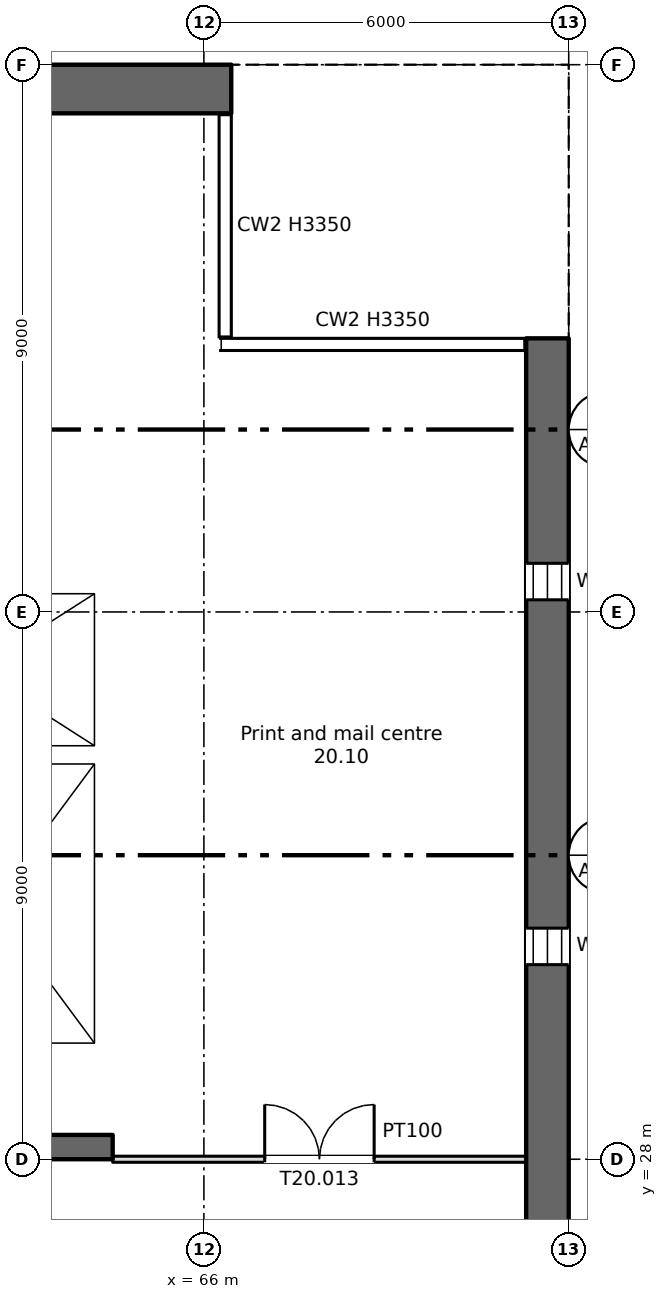
"""IFC4 building model, lengths in metres.
Left out: names, types, materials, properties, quantities, classifications, styles, units other than length and angle.
Written with IfcOpenShell. Run it as: python <this file> out.ifc"""

import sys

from ifc_helpers import new_model, si_unit, direction, frame, frame_2d, origin, place, context, subcontext, project, spatial, rectangle, extrude, element, fill, save


model = new_model("IFC4")
c1 = context("Model", 3, precision=1e-05, world=origin(), true_north=direction((0.0, 1.0)))
c2 = subcontext(c1, "Body", "Model", "MODEL_VIEW")
j1 = project(units=[si_unit("LENGTHUNIT", "METRE"), si_unit("PLANEANGLEUNIT", "RADIAN")], contexts=[c1])
p1 = place(None, origin())
s1 = spatial("IfcSite", under=j1, at=p1, CompositionType="ELEMENT")
p2 = place(p1, origin())
s2 = spatial("IfcBuilding", under=s1, at=p2, CompositionType="ELEMENT")
p3 = place(p2, frame((0.0, 0.0, 132.5)))
s3 = spatial("IfcBuildingStorey", under=s2, at=p3, CompositionType="ELEMENT", Elevation=132.5)
p4 = place(p3, frame((71.65, 6.0, 0.0), z_axis=(0.0, 0.0, 1.0), x_axis=(0.0, 1.0, 0.0)))
e1 = element("IfcWall", 1, at=p4, inside=s3, PredefinedType="SHEAR", context=c2, shape_type="SweptSolid", body=[
    extrude(rectangle(XDim=35.5, YDim=0.7, at=frame_2d((17.75, 0.0))), origin(), (0.0, 0.0, 1.0), 3.35),
])
p5 = place(p4, frame((1.6, 0.0, 0.6)))
e2 = element("IfcOpeningElement", 2, at=p5, cuts=e1, PredefinedType="OPENING", context=c2, shape_type="SweptSolid", body=[
    extrude(rectangle(XDim=0.6, YDim=2.4, at=frame_2d((0.3, 1.2))), frame((0.0, 0.36, 0.0), z_axis=(0.0, -1.0, 0.0), x_axis=(1.0, 0.0, 0.0)), (0.0, 0.0, 1.0), 0.72),
])
p6 = place(p4, frame((7.2, 0.0, 0.6)))
e3 = element("IfcOpeningElement", 3, at=p6, cuts=e1, PredefinedType="OPENING", context=c2, shape_type="SweptSolid", body=[
    extrude(rectangle(XDim=0.6, YDim=2.4, at=frame_2d((0.3, 1.2))), frame((0.0, 0.36, 0.0), z_axis=(0.0, -1.0, 0.0), x_axis=(1.0, 0.0, 0.0)), (0.0, 0.0, 1.0), 0.72),
])
p7 = place(p4, frame((13.2, 0.0, 0.6)))
e4 = element("IfcOpeningElement", 4, at=p7, cuts=e1, PredefinedType="OPENING", context=c2, shape_type="SweptSolid", body=[
    extrude(rectangle(XDim=0.6, YDim=2.4, at=frame_2d((0.3, 1.2))), frame((0.0, 0.36, 0.0), z_axis=(0.0, -1.0, 0.0), x_axis=(1.0, 0.0, 0.0)), (0.0, 0.0, 1.0), 0.72),
])
p8 = place(p4, frame((19.2, 0.0, 0.6)))
e5 = element("IfcOpeningElement", 5, at=p8, cuts=e1, PredefinedType="OPENING", context=c2, shape_type="SweptSolid", body=[
    extrude(rectangle(XDim=0.6, YDim=2.4, at=frame_2d((0.3, 1.2))), frame((0.0, 0.36, 0.0), z_axis=(0.0, -1.0, 0.0), x_axis=(1.0, 0.0, 0.0)), (0.0, 0.0, 1.0), 0.72),
])
p9 = place(p4, frame((25.2, 0.0, 0.6)))
e6 = element("IfcOpeningElement", 6, at=p9, cuts=e1, PredefinedType="OPENING", context=c2, shape_type="SweptSolid", body=[
    extrude(rectangle(XDim=0.6, YDim=2.4, at=frame_2d((0.3, 1.2))), frame((0.0, 0.36, 0.0), z_axis=(0.0, -1.0, 0.0), x_axis=(1.0, 0.0, 0.0)), (0.0, 0.0, 1.0), 0.72),
])
p10 = place(p4, frame((31.2, 0.0, 0.6)))
e7 = element("IfcOpeningElement", 7, at=p10, cuts=e1, PredefinedType="OPENING", context=c2, shape_type="SweptSolid", body=[
    extrude(rectangle(XDim=0.6, YDim=2.4, at=frame_2d((0.3, 1.2))), frame((0.0, 0.36, 0.0), z_axis=(0.0, -1.0, 0.0), x_axis=(1.0, 0.0, 0.0)), (0.0, 0.0, 1.0), 0.72),
])
p11 = place(p3, frame((5.55, 45.6, 0.0), z_axis=(0.0, 0.0, 1.0), x_axis=(1.0, 0.0, 0.0)))
e8 = element("IfcWall", 8, at=p11, inside=s3, PredefinedType="SHEAR", context=c2, shape_type="SweptSolid", body=[
    extrude(rectangle(XDim=60.9, YDim=0.8, at=frame_2d((30.45, 0.0))), origin(), (0.0, 0.0, 1.0), 3.35),
])
p12 = place(p11, frame((1.2, 0.0, 0.6)))
e9 = element("IfcOpeningElement", 9, at=p12, cuts=e8, PredefinedType="OPENING", context=c2, shape_type="SweptSolid", body=[
    extrude(rectangle(XDim=0.6, YDim=2.4, at=frame_2d((0.3, 1.2))), frame((0.0, 0.41, 0.0), z_axis=(0.0, -1.0, 0.0), x_axis=(1.0, 0.0, 0.0)), (0.0, 0.0, 1.0), 0.82),
])
p13 = place(p11, frame((7.2, 0.0, 0.6)))
e10 = element("IfcOpeningElement", 10, at=p13, cuts=e8, PredefinedType="OPENING", context=c2, shape_type="SweptSolid", body=[
    extrude(rectangle(XDim=0.6, YDim=2.4, at=frame_2d((0.3, 1.2))), frame((0.0, 0.41, 0.0), z_axis=(0.0, -1.0, 0.0), x_axis=(1.0, 0.0, 0.0)), (0.0, 0.0, 1.0), 0.82),
])
p14 = place(p11, frame((55.2, 0.0, 0.6)))
e11 = element("IfcOpeningElement", 11, at=p14, cuts=e8, PredefinedType="OPENING", context=c2, shape_type="SweptSolid", body=[
    extrude(rectangle(XDim=0.6, YDim=2.4, at=frame_2d((0.3, 1.2))), frame((0.0, 0.41, 0.0), z_axis=(0.0, -1.0, 0.0), x_axis=(1.0, 0.0, 0.0)), (0.0, 0.0, 1.0), 0.82),
])
p15 = place(p3, frame((6.7, 28.2, 0.0), z_axis=(0.0, 0.0, 1.0), x_axis=(1.0, 0.0, 0.0)))
e12 = element("IfcWall", 12, at=p15, inside=s3, PredefinedType="SHEAR", context=c2, shape_type="SweptSolid", body=[
    extrude(rectangle(XDim=57.8, YDim=0.4, at=frame_2d((28.9, 0.0))), origin(), (0.0, 0.0, 1.0), 3.35),
])
p16 = place(p15, frame((12.812, 0.0, 0.0)))
e13 = element("IfcOpeningElement", 13, at=p16, cuts=e12, PredefinedType="OPENING", context=c2, shape_type="SweptSolid", body=[
    extrude(rectangle(XDim=0.9, YDim=2.1, at=frame_2d((0.45, 1.05))), frame((0.0, 0.21, 0.0), z_axis=(0.0, -1.0, 0.0), x_axis=(1.0, 0.0, 0.0)), (0.0, 0.0, 1.0), 0.42),
])
p17 = place(p15, frame((15.387, 0.0, 0.0)))
e14 = element("IfcOpeningElement", 14, at=p17, cuts=e12, PredefinedType="OPENING", context=c2, shape_type="SweptSolid", body=[
    extrude(rectangle(XDim=0.9, YDim=2.1, at=frame_2d((0.45, 1.05))), frame((0.0, 0.21, 0.0), z_axis=(0.0, -1.0, 0.0), x_axis=(1.0, 0.0, 0.0)), (0.0, 0.0, 1.0), 0.42),
])
p18 = place(p15, frame((48.312, 0.0, 0.0)))
e15 = element("IfcOpeningElement", 15, at=p18, cuts=e12, PredefinedType="OPENING", context=c2, shape_type="SweptSolid", body=[
    extrude(rectangle(XDim=0.9, YDim=2.1, at=frame_2d((0.45, 1.05))), frame((0.0, 0.21, 0.0), z_axis=(0.0, -1.0, 0.0), x_axis=(1.0, 0.0, 0.0)), (0.0, 0.0, 1.0), 0.42),
])
p19 = place(p15, frame((50.887, 0.0, 0.0)))
e16 = element("IfcOpeningElement", 16, at=p19, cuts=e12, PredefinedType="OPENING", context=c2, shape_type="SweptSolid", body=[
    extrude(rectangle(XDim=0.9, YDim=2.1, at=frame_2d((0.45, 1.05))), frame((0.0, 0.21, 0.0), z_axis=(0.0, -1.0, 0.0), x_axis=(1.0, 0.0, 0.0)), (0.0, 0.0, 1.0), 0.42),
])
p20 = place(p15, frame((0.562, 0.0, 0.0)))
e17 = element("IfcOpeningElement", 17, at=p20, cuts=e12, PredefinedType="OPENING", context=c2, shape_type="SweptSolid", body=[
    extrude(rectangle(XDim=0.9, YDim=2.1, at=frame_2d((0.45, 1.05))), frame((0.0, 0.21, 0.0), z_axis=(0.0, -1.0, 0.0), x_axis=(1.0, 0.0, 0.0)), (0.0, 0.0, 1.0), 0.42),
])
p21 = place(p15, frame((2.137, 0.0, 0.0)))
e18 = element("IfcOpeningElement", 18, at=p21, cuts=e12, PredefinedType="OPENING", context=c2, shape_type="SweptSolid", body=[
    extrude(rectangle(XDim=0.9, YDim=2.1, at=frame_2d((0.45, 1.05))), frame((0.0, 0.21, 0.0), z_axis=(0.0, -1.0, 0.0), x_axis=(1.0, 0.0, 0.0)), (0.0, 0.0, 1.0), 0.42),
])
p22 = place(p15, frame((4.7, 0.0, 0.0)))
e19 = element("IfcOpeningElement", 19, at=p22, cuts=e12, PredefinedType="OPENING", context=c2, shape_type="SweptSolid", body=[
    extrude(rectangle(XDim=1.2, YDim=2.1, at=frame_2d((0.6, 1.05))), frame((0.0, 0.21, 0.0), z_axis=(0.0, -1.0, 0.0), x_axis=(1.0, 0.0, 0.0)), (0.0, 0.0, 1.0), 0.42),
])
p23 = place(p15, frame((31.7, 0.0, 0.0)))
e20 = element("IfcOpeningElement", 20, at=p23, cuts=e12, PredefinedType="OPENING", context=c2, shape_type="SweptSolid", body=[
    extrude(rectangle(XDim=1.2, YDim=2.1, at=frame_2d((0.6, 1.05))), frame((0.0, 0.21, 0.0), z_axis=(0.0, -1.0, 0.0), x_axis=(1.0, 0.0, 0.0)), (0.0, 0.0, 1.0), 0.42),
])
p24 = place(p15, frame((55.2, 0.0, 0.0)))
e21 = element("IfcOpeningElement", 21, at=p24, cuts=e12, PredefinedType="OPENING", context=c2, shape_type="SweptSolid", body=[
    extrude(rectangle(XDim=1.2, YDim=2.1, at=frame_2d((0.6, 1.05))), frame((0.0, 0.21, 0.0), z_axis=(0.0, -1.0, 0.0), x_axis=(1.0, 0.0, 0.0)), (0.0, 0.0, 1.0), 0.42),
])
p25 = place(p15, frame((21.7, 0.0, 0.0)))
e22 = element("IfcOpeningElement", 22, at=p25, cuts=e12, PredefinedType="OPENING", context=c2, shape_type="SweptSolid", body=[
    extrude(rectangle(XDim=1.2, YDim=2.1, at=frame_2d((0.6, 1.05))), frame((0.0, 0.21, 0.0), z_axis=(0.0, -1.0, 0.0), x_axis=(1.0, 0.0, 0.0)), (0.0, 0.0, 1.0), 0.42),
])
p26 = place(p15, frame((41.7, 0.0, 0.0)))
e23 = element("IfcOpeningElement", 23, at=p26, cuts=e12, PredefinedType="OPENING", context=c2, shape_type="SweptSolid", body=[
    extrude(rectangle(XDim=1.2, YDim=2.1, at=frame_2d((0.6, 1.05))), frame((0.0, 0.21, 0.0), z_axis=(0.0, -1.0, 0.0), x_axis=(1.0, 0.0, 0.0)), (0.0, 0.0, 1.0), 0.42),
])
p27 = place(p15, frame((24.85, 0.0, 0.0)))
e24 = element("IfcOpeningElement", 24, at=p27, cuts=e12, PredefinedType="OPENING", context=c2, shape_type="SweptSolid", body=[
    extrude(rectangle(XDim=2.4, YDim=2.1, at=frame_2d((1.2, 1.05))), frame((0.0, 0.21, 0.0), z_axis=(0.0, -1.0, 0.0), x_axis=(1.0, 0.0, 0.0)), (0.0, 0.0, 1.0), 0.42),
])
p28 = place(p15, frame((37.35, 0.0, 0.0)))
e25 = element("IfcOpeningElement", 25, at=p28, cuts=e12, PredefinedType="OPENING", context=c2, shape_type="SweptSolid", body=[
    extrude(rectangle(XDim=2.4, YDim=2.1, at=frame_2d((1.2, 1.05))), frame((0.0, 0.21, 0.0), z_axis=(0.0, -1.0, 0.0), x_axis=(1.0, 0.0, 0.0)), (0.0, 0.0, 1.0), 0.42),
])
p29 = place(p15, frame((7.95, 0.0, 0.0)))
e26 = element("IfcOpeningElement", 26, at=p29, cuts=e12, PredefinedType="OPENING", context=c2, shape_type="SweptSolid", body=[
    extrude(rectangle(XDim=2.4, YDim=2.1, at=frame_2d((1.2, 1.05))), frame((0.0, 0.21, 0.0), z_axis=(0.0, -1.0, 0.0), x_axis=(1.0, 0.0, 0.0)), (0.0, 0.0, 1.0), 0.42),
])
p30 = place(p15, frame((28.85, 0.0, 0.0)))
e27 = element("IfcOpeningElement", 27, at=p30, cuts=e12, PredefinedType="OPENING", context=c2, shape_type="SweptSolid", body=[
    extrude(rectangle(XDim=0.9, YDim=2.1, at=frame_2d((0.45, 1.05))), frame((0.0, 0.21, 0.0), z_axis=(0.0, -1.0, 0.0), x_axis=(1.0, 0.0, 0.0)), (0.0, 0.0, 1.0), 0.42),
])
p31 = place(p15, frame((34.85, 0.0, 0.0)))
e28 = element("IfcOpeningElement", 28, at=p31, cuts=e12, PredefinedType="OPENING", context=c2, shape_type="SweptSolid", body=[
    extrude(rectangle(XDim=0.9, YDim=2.1, at=frame_2d((0.45, 1.05))), frame((0.0, 0.21, 0.0), z_axis=(0.0, -1.0, 0.0), x_axis=(1.0, 0.0, 0.0)), (0.0, 0.0, 1.0), 0.42),
])
p32 = place(p3, frame((64.35, 34.8, 0.0), z_axis=(0.0, 0.0, 1.0), x_axis=(0.0, 1.0, 0.0)))
e29 = element("IfcWall", 29, at=p32, inside=s3, PredefinedType="SHEAR", context=c2, shape_type="SweptSolid", body=[
    extrude(rectangle(XDim=10.4, YDim=0.3, at=frame_2d((5.2, 0.0))), origin(), (0.0, 0.0, 1.0), 3.35),
])
p33 = place(p3, frame((64.35, 28.4, 0.0), z_axis=(0.0, 0.0, 1.0), x_axis=(0.0, 1.0, 0.0)))
e30 = element("IfcWall", 30, at=p33, inside=s3, PredefinedType="SHEAR", context=c2, shape_type="SweptSolid", body=[
    extrude(rectangle(XDim=6.1, YDim=0.3, at=frame_2d((3.05, 0.0))), origin(), (0.0, 0.0, 1.0), 3.35),
])
p34 = place(p3, frame((60.3, 34.65, 0.0), z_axis=(0.0, 0.0, 1.0), x_axis=(1.0, 0.0, 0.0)))
e31 = element("IfcWall", 31, at=p34, inside=s3, PredefinedType="SHEAR", context=c2, shape_type="SweptSolid", body=[
    extrude(rectangle(XDim=4.2, YDim=0.3, at=frame_2d((2.1, 0.0))), origin(), (0.0, 0.0, 1.0), 3.35),
])
p35 = place(p3, frame((60.3, 37.45, 0.0), z_axis=(0.0, 0.0, 1.0), x_axis=(1.0, 0.0, 0.0)))
e32 = element("IfcWall", 32, at=p35, inside=s3, PredefinedType="SHEAR", context=c2, shape_type="SweptSolid", body=[
    extrude(rectangle(XDim=3.9, YDim=0.3, at=frame_2d((1.95, 0.0))), origin(), (0.0, 0.0, 1.0), 3.35),
])
p36 = place(p35, frame((1.4, 0.0, 0.0)))
e33 = element("IfcOpeningElement", 33, at=p36, cuts=e32, PredefinedType="OPENING", context=c2, shape_type="SweptSolid", body=[
    extrude(rectangle(XDim=1.1, YDim=2.1, at=frame_2d((0.55, 1.05))), frame((0.0, 0.16, 0.0), z_axis=(0.0, -1.0, 0.0), x_axis=(1.0, 0.0, 0.0)), (0.0, 0.0, 1.0), 0.32),
])
p37 = place(p3, frame((64.5, 28.0, 0.0), z_axis=(0.0, 0.0, 1.0), x_axis=(1.0, 0.0, 0.0)))
e34 = element("IfcWall", 34, at=p37, inside=s3, PredefinedType="PARTITIONING", context=c2, shape_type="SweptSolid", body=[
    extrude(rectangle(XDim=6.8, YDim=0.1, at=frame_2d((3.4, 0.0))), origin(), (0.0, 0.0, 1.0), 3.35),
])
p38 = place(p37, frame((2.5, 0.0, 0.0)))
e35 = element("IfcOpeningElement", 35, at=p38, cuts=e34, PredefinedType="OPENING", context=c2, shape_type="SweptSolid", body=[
    extrude(rectangle(XDim=1.8, YDim=2.1, at=frame_2d((0.9, 1.05))), frame((0.0, 0.06, 0.0), z_axis=(0.0, -1.0, 0.0), x_axis=(1.0, 0.0, 0.0)), (0.0, 0.0, 1.0), 0.12),
])
p39 = place(p9, origin())
e36 = element("IfcWindow", 36, at=p39, inside=s3, PartitioningType="SINGLE_PANEL", PredefinedType="WINDOW", context=c2, shape_type="SweptSolid", body=[
    extrude(rectangle(XDim=0.6, YDim=2.4, at=frame_2d((0.3, 1.2))), frame((0.0, 0.03, 0.0), z_axis=(0.0, -1.0, 0.0), x_axis=(1.0, 0.0, 0.0)), (0.0, 0.0, 1.0), 0.06),
])
fill(e6, e36)
p40 = place(p10, origin())
e37 = element("IfcWindow", 37, at=p40, inside=s3, PartitioningType="SINGLE_PANEL", PredefinedType="WINDOW", context=c2, shape_type="SweptSolid", body=[
    extrude(rectangle(XDim=0.6, YDim=2.4, at=frame_2d((0.3, 1.2))), frame((0.0, 0.03, 0.0), z_axis=(0.0, -1.0, 0.0), x_axis=(1.0, 0.0, 0.0)), (0.0, 0.0, 1.0), 0.06),
])
fill(e7, e37)
p41 = place(p38, origin())
e38 = element("IfcDoor", 38, at=p41, inside=s3, OperationType="DOUBLE_DOOR_SINGLE_SWING", PredefinedType="DOOR", context=c2, shape_type="SweptSolid", body=[
    extrude(rectangle(XDim=1.8, YDim=2.1, at=frame_2d((0.9, 1.05))), frame((0.0, 0.025, 0.0), z_axis=(0.0, -1.0, 0.0), x_axis=(1.0, 0.0, 0.0)), (0.0, 0.0, 1.0), 0.05),
])
fill(e35, e38)
save(model, sys.argv[1])
